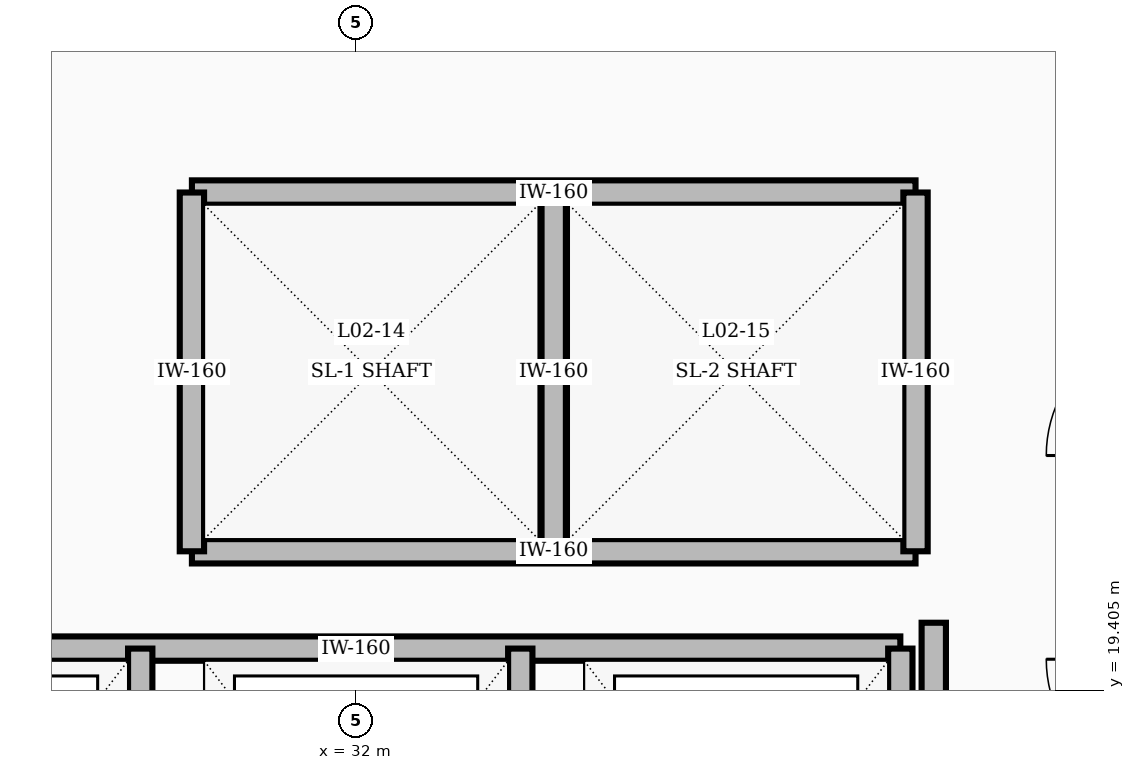
"""IFC4 building model, lengths in metres.
Left out: names, types, materials, properties, quantities, classifications, styles, units other than length and angle.
Written with IfcOpenShell. Run it as: python <this file> out.ifc"""

import sys

from ifc_helpers import new_model, si_unit, direction, frame, frame_2d, origin, place, context, subcontext, project, spatial, rectangle, extrude, element, save


model = new_model("IFC4")
c1 = context("Model", 3, precision=1e-05, world=origin(), true_north=direction((0.0, 1.0)))
c2 = subcontext(c1, "Body", "Model", "MODEL_VIEW")
j1 = project(units=[si_unit("LENGTHUNIT", "METRE"), si_unit("PLANEANGLEUNIT", "RADIAN")], contexts=[c1])
p1 = place(None, origin())
s1 = spatial("IfcSite", under=j1, at=p1, CompositionType="ELEMENT")
p2 = place(p1, origin())
s2 = spatial("IfcBuilding", under=s1, at=p2, CompositionType="ELEMENT")
p3 = place(p2, frame((0.0, 0.0, 5.2)))
s3 = spatial("IfcBuildingStorey", under=s2, at=p3, CompositionType="ELEMENT", Elevation=5.2)
p4 = place(p3, frame((35.8, 16.55, 0.0), z_axis=(0.0, 0.0, 1.0), x_axis=(0.0, 1.0, 0.0)))
e1 = element("IfcWall", 1, at=p4, inside=s3, PredefinedType="SOLIDWALL", context=c2, shape_type="SweptSolid", body=[
    extrude(rectangle(XDim=3.3, YDim=0.16, at=frame_2d((1.65, 0.0))), origin(), (0.0, 0.0, 1.0), 3.52),
])
for number, where, z_axis, x_axis in (
    (2, (30.92, 22.68, 0.0), (0.0, 0.0, 1.0), (1.0, 0.0, 0.0)),
    (3, (30.92, 20.32, 0.0), (0.0, 0.0, 1.0), (1.0, 0.0, 0.0)),
):
    element("IfcWall", number, at=place(p3, frame(where, z_axis=z_axis, x_axis=x_axis)), inside=s3, PredefinedType="SOLIDWALL", context=c2, shape_type="SweptSolid", body=[
        extrude(rectangle(XDim=4.76, YDim=0.16, at=frame_2d((2.38, 0.0))), origin(), (0.0, 0.0, 1.0), 3.52),
    ])
for number, where, z_axis, x_axis in (
    (4, (30.92, 20.32, 0.0), (0.0, 0.0, 1.0), (0.0, 1.0, 0.0)),
    (5, (33.3, 20.32, 0.0), (0.0, 0.0, 1.0), (0.0, 1.0, 0.0)),
    (6, (35.68, 20.32, 0.0), (0.0, 0.0, 1.0), (0.0, 1.0, 0.0)),
):
    element("IfcWall", number, at=place(p3, frame(where, z_axis=z_axis, x_axis=x_axis)), inside=s3, PredefinedType="SOLIDWALL", context=c2, shape_type="SweptSolid", body=[
        extrude(rectangle(XDim=2.36, YDim=0.16, at=frame_2d((1.18, 0.0))), origin(), (0.0, 0.0, 1.0), 3.52),
    ])
p5 = place(p3, frame((28.42, 19.68, 0.0), z_axis=(0.0, 0.0, 1.0), x_axis=(1.0, 0.0, 0.0)))
e7 = element("IfcWall", 7, at=p5, inside=s3, PredefinedType="SOLIDWALL", context=c2, shape_type="SweptSolid", body=[
    extrude(rectangle(XDim=7.16, YDim=0.16, at=frame_2d((3.58, 0.0))), origin(), (0.0, 0.0, 1.0), 3.52),
])
for number, where, z_axis, x_axis in (
    (8, (30.58, 16.92, 0.0), (0.0, 0.0, 1.0), (0.0, 1.0, 0.0)),
    (9, (33.08, 16.92, 0.0), (0.0, 0.0, 1.0), (0.0, 1.0, 0.0)),
    (10, (35.58, 16.92, 0.0), (0.0, 0.0, 1.0), (0.0, 1.0, 0.0)),
):
    element("IfcWall", number, at=place(p3, frame(where, z_axis=z_axis, x_axis=x_axis)), inside=s3, PredefinedType="SOLIDWALL", context=c2, shape_type="SweptSolid", body=[
        extrude(rectangle(XDim=2.76, YDim=0.16, at=frame_2d((1.38, 0.0))), origin(), (0.0, 0.0, 1.0), 3.52),
    ])
save(model, sys.argv[1])
